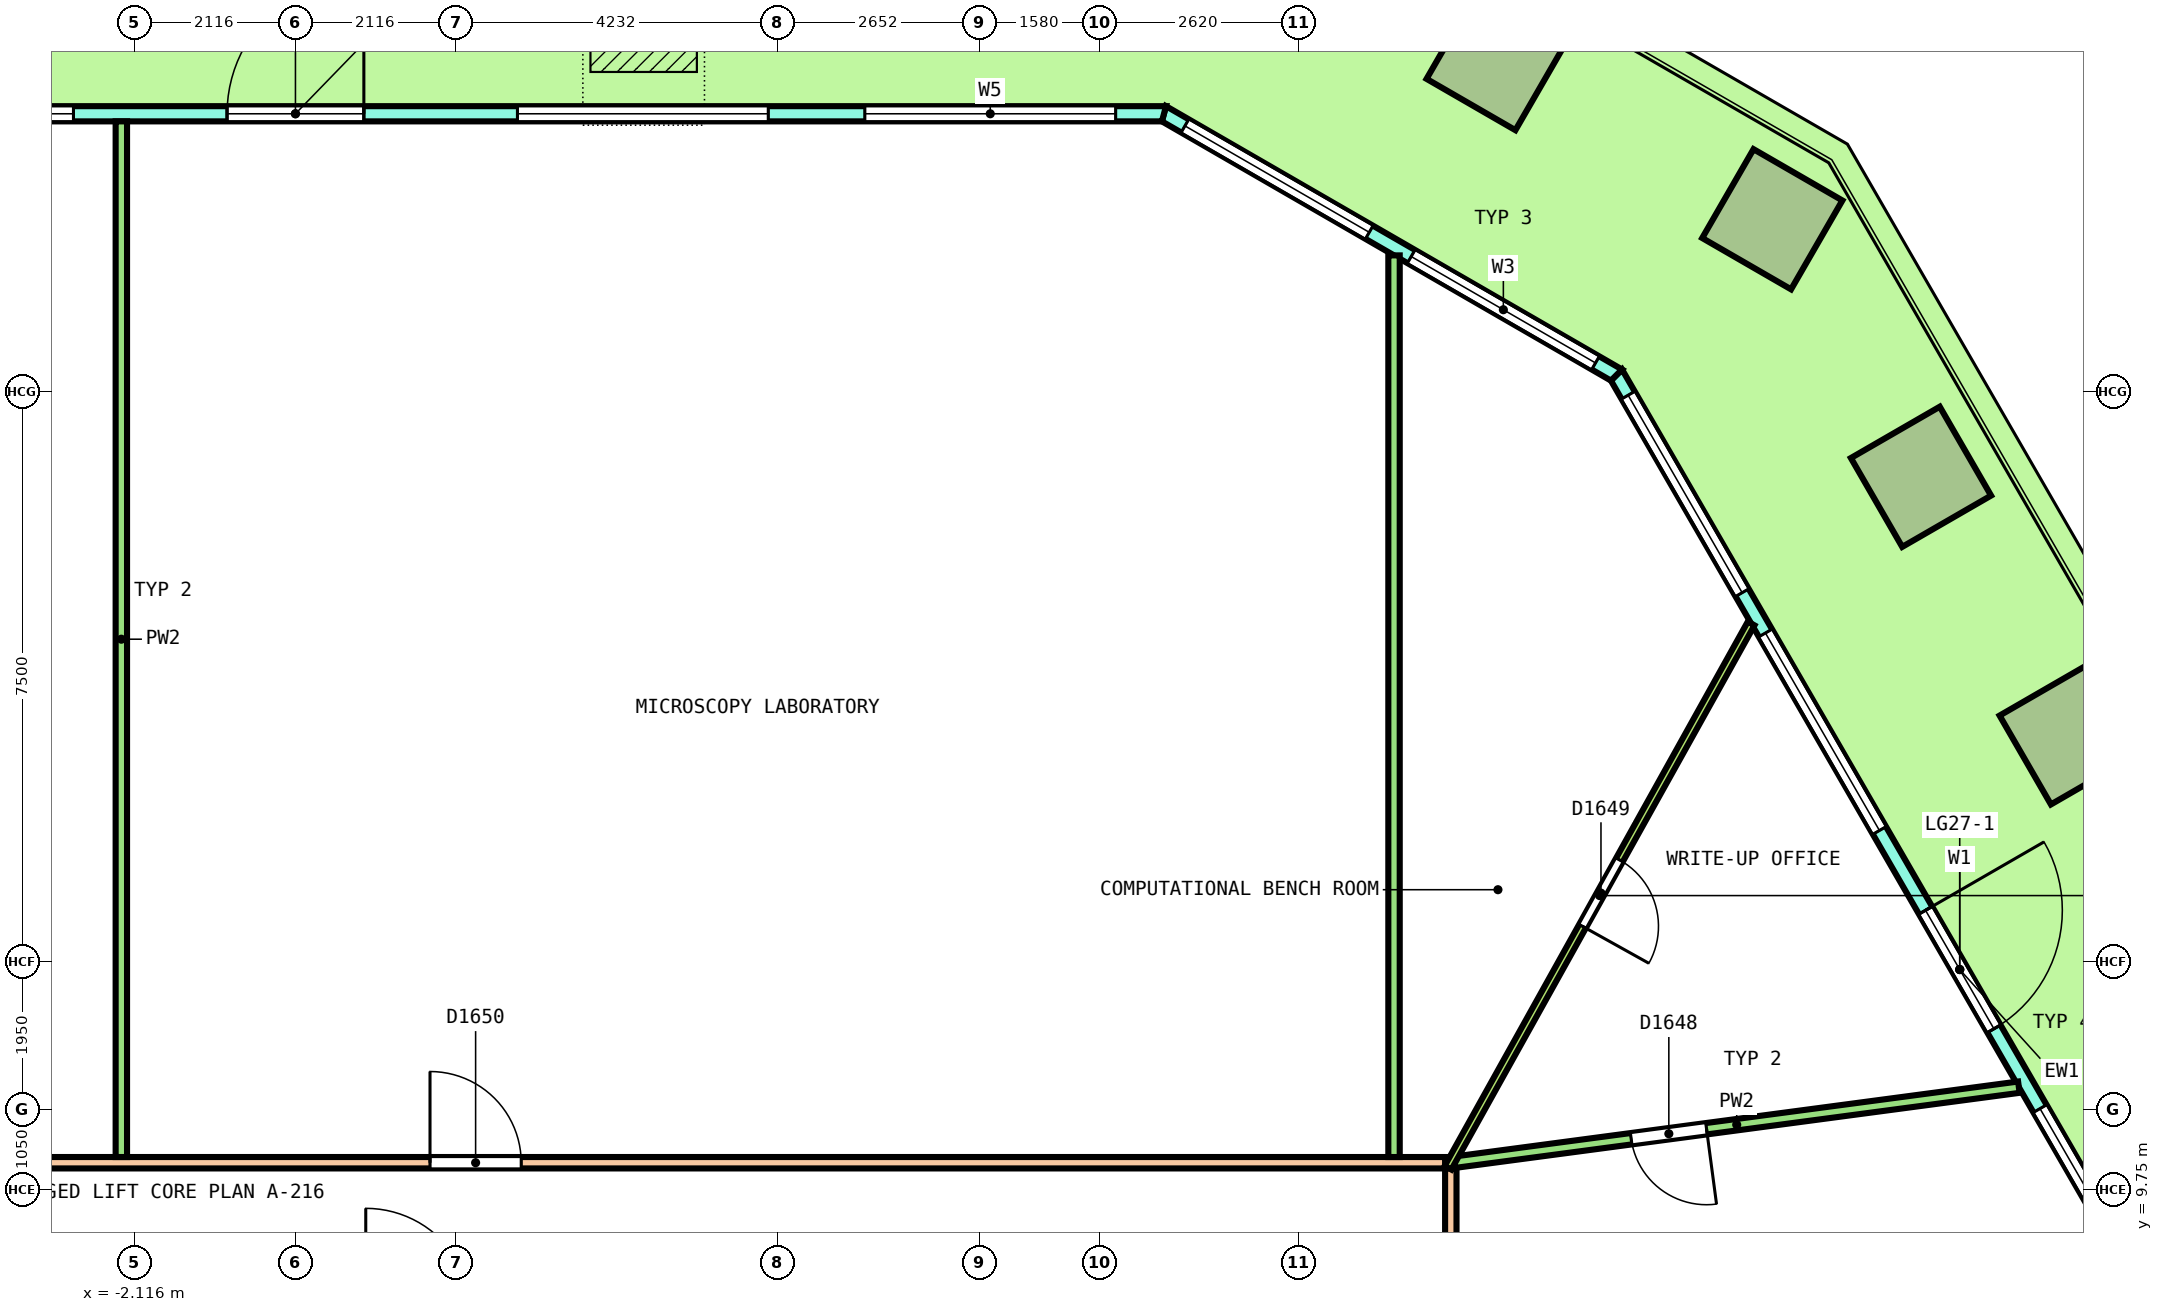
"""IFC4 building model, lengths in metres.
Left out: names, types, materials, properties, quantities, classifications, styles, units other than length and angle.
Written with IfcOpenShell. Run it as: python <this file> out.ifc"""

import sys

from ifc_helpers import new_model, si_unit, direction, frame, frame_2d, origin, origin_2d, place, context, subcontext, project, spatial, polyline, rectangle, outline, extrude, element, fill, save


model = new_model("IFC4")
c1 = context("Model", 3, precision=1e-05, world=origin(), true_north=direction((0.0, 1.0)))
c2 = subcontext(c1, "Body", "Model", "MODEL_VIEW")
j1 = project(units=[si_unit("LENGTHUNIT", "METRE"), si_unit("PLANEANGLEUNIT", "RADIAN")], contexts=[c1])
p1 = place(None, origin())
s1 = spatial("IfcSite", under=j1, at=p1, CompositionType="ELEMENT")
p2 = place(p1, origin())
s2 = spatial("IfcBuilding", under=s1, at=p2, CompositionType="ELEMENT")
p3 = place(p2, frame((0.0, 0.0, 126.4)))
s3 = spatial("IfcBuildingStorey", under=s2, at=p3, CompositionType="ELEMENT", Elevation=126.4)
for number, where, z_axis, x_axis in (
    (1, (23.342, 15.736, 0.0), (0.0, 0.0, 1.0), (-0.5, 0.866, 0.0)),
    (2, (21.386, 19.124, 0.0), (0.0, 0.0, 1.0), (-0.5, 0.866, 0.0)),
    (3, (19.43, 22.512, 0.0), (0.0, 0.0, 1.0), (-0.866, 0.5, 0.0)),
    (4, (15.803, 24.606, 0.0), (0.0, 0.0, 1.0), (-0.866, 0.5, 0.0)),
):
    element("IfcColumn", number, at=place(p3, frame(where, z_axis=z_axis, x_axis=x_axis)), inside=s3, PredefinedType="COLUMN", context=c2, shape_type="SweptSolid", body=[
        extrude(rectangle(XDim=1.35, YDim=1.35, at=origin_2d()), origin(), (0.0, 0.0, 1.0), 4.05),
    ])
p4 = place(p3, frame((26.411, 4.82, 0.0), z_axis=(0.0, 0.0, 1.0), x_axis=(-0.500000137386, 0.866025324465, 0.0)))
e5 = element("IfcWall", 5, at=p4, inside=s3, PredefinedType="SOLIDWALL", context=c2, shape_type="SweptSolid", body=[
    extrude(outline(polyline([(-0.027, -0.1), (0.979, -0.1), (1.986, -0.1), (2.992, -0.1), (3.999, -0.1), (5.005, -0.1), (6.012, -0.1), (7.018, -0.1), (8.025, -0.1), (9.031, -0.1), (10.038, -0.1), (11.044, -0.1), (12.051, -0.1), (13.057, -0.1), (14.063, -0.1), (15.07, -0.1), (16.076, -0.1), (17.083, -0.1), (18.089, -0.1), (18.036, 0.1), (17.035, 0.1), (16.035, 0.1), (15.034, 0.1), (14.034, 0.1), (13.033, 0.1), (12.033, 0.1), (11.032, 0.1), (10.032, 0.1), (9.031, 0.1), (8.031, 0.1), (7.03, 0.1), (6.03, 0.1), (5.029, 0.1), (4.029, 0.1), (3.028, 0.1), (2.028, 0.1), (1.027, 0.1), (0.027, 0.1), (-0.027, -0.1)])), origin(), (0.0, 0.0, 1.0), 4.1),
])
p5 = place(p4, frame((0.306, 0.0, 0.1)))
e6 = element("IfcOpeningElement", 6, at=p5, cuts=e5, PredefinedType="OPENING", context=c2, shape_type="SweptSolid", body=[
    extrude(rectangle(XDim=3.0, YDim=2.9, at=frame_2d((1.5, 1.45))), frame((0.0, 0.11, 0.0), z_axis=(0.0, -1.0, 0.0), x_axis=(1.0, 0.0, 0.0)), (0.0, 0.0, 1.0), 0.22),
])
p6 = place(p4, frame((3.919, 0.0, 0.1)))
e7 = element("IfcOpeningElement", 7, at=p6, cuts=e5, PredefinedType="OPENING", context=c2, shape_type="SweptSolid", body=[
    extrude(rectangle(XDim=3.0, YDim=2.9, at=frame_2d((1.5, 1.45))), frame((0.0, 0.11, 0.0), z_axis=(0.0, -1.0, 0.0), x_axis=(1.0, 0.0, 0.0)), (0.0, 0.0, 1.0), 0.22),
])
p7 = place(p4, frame((8.131, 0.0, 0.0)))
e8 = element("IfcOpeningElement", 8, at=p7, cuts=e5, PredefinedType="OPENING", context=c2, shape_type="SweptSolid", body=[
    extrude(rectangle(XDim=1.8, YDim=2.4, at=frame_2d((0.9, 1.2))), frame((0.0, 0.11, 0.0), z_axis=(0.0, -1.0, 0.0), x_axis=(1.0, 0.0, 0.0)), (0.0, 0.0, 1.0), 0.22),
])
p8 = place(p4, frame((8.131, 0.0, 2.55)))
e9 = element("IfcOpeningElement", 9, at=p8, cuts=e5, PredefinedType="OPENING", context=c2, shape_type="SweptSolid", body=[
    extrude(rectangle(XDim=1.8, YDim=0.45, at=frame_2d((0.9, 0.225))), frame((0.0, 0.11, 0.0), z_axis=(0.0, -1.0, 0.0), x_axis=(1.0, 0.0, 0.0)), (0.0, 0.0, 1.0), 0.22),
])
p9 = place(p4, frame((11.144, 0.0, 0.1)))
e10 = element("IfcOpeningElement", 10, at=p9, cuts=e5, PredefinedType="OPENING", context=c2, shape_type="SweptSolid", body=[
    extrude(rectangle(XDim=3.0, YDim=2.9, at=frame_2d((1.5, 1.45))), frame((0.0, 0.11, 0.0), z_axis=(0.0, -1.0, 0.0), x_axis=(1.0, 0.0, 0.0)), (0.0, 0.0, 1.0), 0.22),
])
p10 = place(p4, frame((14.756, 0.0, 0.1)))
e11 = element("IfcOpeningElement", 11, at=p10, cuts=e5, PredefinedType="OPENING", context=c2, shape_type="SweptSolid", body=[
    extrude(rectangle(XDim=3.0, YDim=2.9, at=frame_2d((1.5, 1.45))), frame((0.0, 0.11, 0.0), z_axis=(0.0, -1.0, 0.0), x_axis=(1.0, 0.0, 0.0)), (0.0, 0.0, 1.0), 0.22),
])
p11 = place(p3, frame((17.38, 20.463, 0.0), z_axis=(0.0, 0.0, 1.0), x_axis=(-0.866029458321, 0.49999297727, 0.0)))
e12 = element("IfcWall", 12, at=p11, inside=s3, PredefinedType="SOLIDWALL", context=c2, shape_type="SweptSolid", body=[
    extrude(outline(polyline([(-0.027, -0.1), (1.128, -0.1), (2.282, -0.1), (3.437, -0.1), (4.592, -0.1), (5.747, -0.1), (6.901, -0.1), (6.848, 0.1), (5.711, 0.1), (4.574, 0.1), (3.437, 0.1), (2.301, 0.1), (1.164, 0.1), (0.027, 0.1), (-0.027, -0.1)])), origin(), (0.0, 0.0, 1.0), 4.1),
])
p12 = place(p11, frame((0.319, 0.0, 0.1)))
e13 = element("IfcOpeningElement", 13, at=p12, cuts=e12, PredefinedType="OPENING", context=c2, shape_type="SweptSolid", body=[
    extrude(rectangle(XDim=2.8, YDim=2.9, at=frame_2d((1.4, 1.45))), frame((0.0, 0.11, 0.0), z_axis=(0.0, -1.0, 0.0), x_axis=(1.0, 0.0, 0.0)), (0.0, 0.0, 1.0), 0.22),
])
p13 = place(p11, frame((3.756, 0.0, 0.1)))
e14 = element("IfcOpeningElement", 14, at=p13, cuts=e12, PredefinedType="OPENING", context=c2, shape_type="SweptSolid", body=[
    extrude(rectangle(XDim=2.8, YDim=2.9, at=frame_2d((1.4, 1.45))), frame((0.0, 0.11, 0.0), z_axis=(0.0, -1.0, 0.0), x_axis=(1.0, 0.0, 0.0)), (0.0, 0.0, 1.0), 0.22),
])
p14 = place(p3, frame((11.426, 23.9, 0.0), z_axis=(0.0, 0.0, 1.0), x_axis=(-1.0, 0.0, 0.0)))
e15 = element("IfcWall", 15, at=p14, inside=s3, PredefinedType="SOLIDWALL", context=c2, shape_type="SweptSolid", body=[
    extrude(outline(polyline([(-0.027, -0.1), (1.014, -0.1), (2.055, -0.1), (3.097, -0.1), (4.138, -0.1), (5.179, -0.1), (6.22, -0.1), (7.261, -0.1), (8.303, -0.1), (9.344, -0.1), (10.385, -0.1), (11.426, -0.1), (12.468, -0.1), (13.509, -0.1), (14.55, -0.1), (15.591, -0.1), (16.632, -0.1), (17.673, -0.1), (18.715, -0.1), (19.756, -0.1), (20.797, -0.1), (21.838, -0.1), (22.879, -0.1), (22.826, 0.1), (21.789, 0.1), (20.753, 0.1), (19.717, 0.1), (18.68, 0.1), (17.644, 0.1), (16.608, 0.1), (15.572, 0.1), (14.535, 0.1), (13.499, 0.1), (12.463, 0.1), (11.426, 0.1), (10.39, 0.1), (9.354, 0.1), (8.317, 0.1), (7.281, 0.1), (6.245, 0.1), (5.208, 0.1), (4.172, 0.1), (3.136, 0.1), (2.099, 0.1), (1.063, 0.1), (0.027, 0.1), (-0.027, -0.1)])), origin(), (0.0, 0.0, 1.0), 4.1),
])
p15 = place(p14, frame((0.635, 0.0, 0.1)))
e16 = element("IfcOpeningElement", 16, at=p15, cuts=e15, PredefinedType="OPENING", context=c2, shape_type="SweptSolid", body=[
    extrude(rectangle(XDim=3.3, YDim=2.9, at=frame_2d((1.65, 1.45))), frame((0.0, 0.11, 0.0), z_axis=(0.0, -1.0, 0.0), x_axis=(1.0, 0.0, 0.0)), (0.0, 0.0, 1.0), 0.22),
])
p16 = place(p14, frame((5.206, 0.0, 0.1)))
e17 = element("IfcOpeningElement", 17, at=p16, cuts=e15, PredefinedType="OPENING", context=c2, shape_type="SweptSolid", body=[
    extrude(rectangle(XDim=3.3, YDim=2.9, at=frame_2d((1.65, 1.45))), frame((0.0, 0.11, 0.0), z_axis=(0.0, -1.0, 0.0), x_axis=(1.0, 0.0, 0.0)), (0.0, 0.0, 1.0), 0.22),
])
p17 = place(p14, frame((10.526, 0.0, 0.0)))
e18 = element("IfcOpeningElement", 18, at=p17, cuts=e15, PredefinedType="OPENING", context=c2, shape_type="SweptSolid", body=[
    extrude(rectangle(XDim=1.8, YDim=2.4, at=frame_2d((0.9, 1.2))), frame((0.0, 0.11, 0.0), z_axis=(0.0, -1.0, 0.0), x_axis=(1.0, 0.0, 0.0)), (0.0, 0.0, 1.0), 0.22),
])
p18 = place(p14, frame((10.526, 0.0, 2.55)))
e19 = element("IfcOpeningElement", 19, at=p18, cuts=e15, PredefinedType="OPENING", context=c2, shape_type="SweptSolid", body=[
    extrude(rectangle(XDim=1.8, YDim=0.45, at=frame_2d((0.9, 0.225))), frame((0.0, 0.11, 0.0), z_axis=(0.0, -1.0, 0.0), x_axis=(1.0, 0.0, 0.0)), (0.0, 0.0, 1.0), 0.22),
])
p19 = place(p14, frame((14.347, 0.0, 0.1)))
e20 = element("IfcOpeningElement", 20, at=p19, cuts=e15, PredefinedType="OPENING", context=c2, shape_type="SweptSolid", body=[
    extrude(rectangle(XDim=3.3, YDim=2.9, at=frame_2d((1.65, 1.45))), frame((0.0, 0.11, 0.0), z_axis=(0.0, -1.0, 0.0), x_axis=(1.0, 0.0, 0.0)), (0.0, 0.0, 1.0), 0.22),
])
p20 = place(p14, frame((18.917, 0.0, 0.1)))
e21 = element("IfcOpeningElement", 21, at=p20, cuts=e15, PredefinedType="OPENING", context=c2, shape_type="SweptSolid", body=[
    extrude(rectangle(XDim=3.3, YDim=2.9, at=frame_2d((1.65, 1.45))), frame((0.0, 0.11, 0.0), z_axis=(0.0, -1.0, 0.0), x_axis=(1.0, 0.0, 0.0)), (0.0, 0.0, 1.0), 0.22),
])
p21 = place(p3, frame((15.2, 0.576, 0.0), z_axis=(0.0, 0.0, 1.0), x_axis=(0.0, 1.0, 0.0)))
e22 = element("IfcWall", 22, at=p21, inside=s3, PredefinedType="PARTITIONING", context=c2, shape_type="SweptSolid", body=[
    extrude(rectangle(XDim=9.449, YDim=0.15, at=frame_2d((4.725, 0.0))), origin(), (0.0, 0.0, 1.0), 3.05),
])
p22 = place(p3, frame((-15.125, 10.1, 0.0), z_axis=(0.0, 0.0, 1.0), x_axis=(1.0, 0.0, 0.0)))
e23 = element("IfcWall", 23, at=p22, inside=s3, PredefinedType="PARTITIONING", context=c2, shape_type="SweptSolid", body=[
    extrude(rectangle(XDim=30.25, YDim=0.15, at=frame_2d((15.125, 0.0))), origin(), (0.0, 0.0, 1.0), 3.05),
])
p23 = place(p22, frame((16.895, 0.0, 0.0)))
e24 = element("IfcOpeningElement", 24, at=p23, cuts=e23, PredefinedType="OPENING", context=c2, shape_type="SweptSolid", body=[
    extrude(rectangle(XDim=1.2, YDim=2.1, at=frame_2d((0.6, 1.05))), frame((0.0, 0.085, 0.0), z_axis=(0.0, -1.0, 0.0), x_axis=(1.0, 0.0, 0.0)), (0.0, 0.0, 1.0), 0.17),
])
p24 = place(p22, frame((6.564, 0.0, 0.0)))
e25 = element("IfcOpeningElement", 25, at=p24, cuts=e23, PredefinedType="OPENING", context=c2, shape_type="SweptSolid", body=[
    extrude(rectangle(XDim=1.2, YDim=2.1, at=frame_2d((0.6, 1.05))), frame((0.0, 0.085, 0.0), z_axis=(0.0, -1.0, 0.0), x_axis=(1.0, 0.0, 0.0)), (0.0, 0.0, 1.0), 0.17),
])
p25 = place(p22, frame((1.476, 0.0, 0.0)))
e26 = element("IfcOpeningElement", 26, at=p25, cuts=e23, PredefinedType="OPENING", context=c2, shape_type="SweptSolid", body=[
    extrude(rectangle(XDim=1.2, YDim=2.1, at=frame_2d((0.6, 1.05))), frame((0.0, 0.085, 0.0), z_axis=(0.0, -1.0, 0.0), x_axis=(1.0, 0.0, 0.0)), (0.0, 0.0, 1.0), 0.17),
])
p26 = place(p3, frame((15.25, 10.107, 0.0), z_axis=(0.0, 0.0, 1.0), x_axis=(0.991272259153, 0.131830604315, 0.0)))
e27 = element("IfcWall", 27, at=p26, inside=s3, PredefinedType="PARTITIONING", context=c2, shape_type="SweptSolid", body=[
    extrude(rectangle(XDim=7.489, YDim=0.15, at=frame_2d((3.745, 0.0))), origin(), (0.0, 0.0, 1.0), 3.05),
])
p27 = place(p26, frame((2.344, 0.0, 0.0)))
e28 = element("IfcOpeningElement", 28, at=p27, cuts=e27, PredefinedType="OPENING", context=c2, shape_type="SweptSolid", body=[
    extrude(rectangle(XDim=1.0, YDim=2.1, at=frame_2d((0.5, 1.05))), frame((0.0, 0.085, 0.0), z_axis=(0.0, -1.0, 0.0), x_axis=(1.0, 0.0, 0.0)), (0.0, 0.0, 1.0), 0.17),
])
p28 = place(p3, frame((14.453, 10.175, 0.0), z_axis=(0.0, 0.0, 1.0), x_axis=(0.0, 1.0, 0.0)))
e29 = element("IfcWall", 29, at=p28, inside=s3, PredefinedType="PARTITIONING", context=c2, shape_type="SweptSolid", body=[
    extrude(rectangle(XDim=11.862, YDim=0.15, at=frame_2d((5.931, 0.0))), origin(), (0.0, 0.0, 1.0), 3.05),
])
p29 = place(p3, frame((-2.291, 10.175, 0.0), z_axis=(0.0, 0.0, 1.0), x_axis=(0.0, 1.0, 0.0)))
e30 = element("IfcWall", 30, at=p29, inside=s3, PredefinedType="PARTITIONING", context=c2, shape_type="SweptSolid", body=[
    extrude(rectangle(XDim=13.625, YDim=0.15, at=frame_2d((6.812, 0.0))), origin(), (0.0, 0.0, 1.0), 3.05),
])
p30 = place(p3, frame((15.164, 10.034, 0.0), z_axis=(0.0, 0.0, 1.0), x_axis=(0.486568356271, 0.873642509655, 0.0)))
e31 = element("IfcWall", 31, at=p30, inside=s3, PredefinedType="PARTITIONING", context=c2, shape_type="SweptSolid", body=[
    extrude(rectangle(XDim=8.196, YDim=0.1, at=frame_2d((4.098, 0.0))), origin(), (0.0, 0.0, 1.0), 3.05),
])
p31 = place(p30, frame((3.635, 0.0, 0.0)))
e32 = element("IfcOpeningElement", 32, at=p31, cuts=e31, PredefinedType="OPENING", context=c2, shape_type="SweptSolid", body=[
    extrude(rectangle(XDim=1.0, YDim=2.1, at=frame_2d((0.5, 1.05))), frame((0.0, 0.06, 0.0), z_axis=(0.0, -1.0, 0.0), x_axis=(1.0, 0.0, 0.0)), (0.0, 0.0, 1.0), 0.12),
])
p32 = place(p6, origin())
e33 = element("IfcWindow", 33, at=p32, inside=s3, PartitioningType="SINGLE_PANEL", PredefinedType="WINDOW", context=c2, shape_type="SweptSolid", body=[
    extrude(rectangle(XDim=3.0, YDim=2.9, at=frame_2d((1.5, 1.45))), frame((0.0, 0.03, 0.0), z_axis=(0.0, -1.0, 0.0), x_axis=(1.0, 0.0, 0.0)), (0.0, 0.0, 1.0), 0.06),
])
fill(e7, e33)
p33 = place(p7, origin())
e34 = element("IfcDoor", 34, at=p33, inside=s3, OperationType="DOUBLE_DOOR_SINGLE_SWING", PredefinedType="DOOR", context=c2, shape_type="SweptSolid", body=[
    extrude(rectangle(XDim=1.8, YDim=2.4, at=frame_2d((0.9, 1.2))), frame((0.0, 0.025, 0.0), z_axis=(0.0, -1.0, 0.0), x_axis=(1.0, 0.0, 0.0)), (0.0, 0.0, 1.0), 0.05),
])
fill(e8, e34)
p34 = place(p8, origin())
e35 = element("IfcWindow", 35, at=p34, inside=s3, PartitioningType="SINGLE_PANEL", PredefinedType="WINDOW", context=c2, shape_type="SweptSolid", body=[
    extrude(rectangle(XDim=1.8, YDim=0.45, at=frame_2d((0.9, 0.225))), frame((0.0, 0.03, 0.0), z_axis=(0.0, -1.0, 0.0), x_axis=(1.0, 0.0, 0.0)), (0.0, 0.0, 1.0), 0.06),
])
fill(e9, e35)
p35 = place(p9, origin())
e36 = element("IfcWindow", 36, at=p35, inside=s3, PartitioningType="SINGLE_PANEL", PredefinedType="WINDOW", context=c2, shape_type="SweptSolid", body=[
    extrude(rectangle(XDim=3.0, YDim=2.9, at=frame_2d((1.5, 1.45))), frame((0.0, 0.03, 0.0), z_axis=(0.0, -1.0, 0.0), x_axis=(1.0, 0.0, 0.0)), (0.0, 0.0, 1.0), 0.06),
])
fill(e10, e36)
p36 = place(p10, origin())
e37 = element("IfcWindow", 37, at=p36, inside=s3, PartitioningType="SINGLE_PANEL", PredefinedType="WINDOW", context=c2, shape_type="SweptSolid", body=[
    extrude(rectangle(XDim=3.0, YDim=2.9, at=frame_2d((1.5, 1.45))), frame((0.0, 0.03, 0.0), z_axis=(0.0, -1.0, 0.0), x_axis=(1.0, 0.0, 0.0)), (0.0, 0.0, 1.0), 0.06),
])
fill(e11, e37)
p37 = place(p12, origin())
e38 = element("IfcWindow", 38, at=p37, inside=s3, PartitioningType="SINGLE_PANEL", PredefinedType="WINDOW", context=c2, shape_type="SweptSolid", body=[
    extrude(rectangle(XDim=2.8, YDim=2.9, at=frame_2d((1.4, 1.45))), frame((0.0, 0.03, 0.0), z_axis=(0.0, -1.0, 0.0), x_axis=(1.0, 0.0, 0.0)), (0.0, 0.0, 1.0), 0.06),
])
fill(e13, e38)
p38 = place(p13, origin())
e39 = element("IfcWindow", 39, at=p38, inside=s3, PartitioningType="SINGLE_PANEL", PredefinedType="WINDOW", context=c2, shape_type="SweptSolid", body=[
    extrude(rectangle(XDim=2.8, YDim=2.9, at=frame_2d((1.4, 1.45))), frame((0.0, 0.03, 0.0), z_axis=(0.0, -1.0, 0.0), x_axis=(1.0, 0.0, 0.0)), (0.0, 0.0, 1.0), 0.06),
])
fill(e14, e39)
p39 = place(p15, origin())
e40 = element("IfcWindow", 40, at=p39, inside=s3, PartitioningType="SINGLE_PANEL", PredefinedType="WINDOW", context=c2, shape_type="SweptSolid", body=[
    extrude(rectangle(XDim=3.3, YDim=2.9, at=frame_2d((1.65, 1.45))), frame((0.0, 0.03, 0.0), z_axis=(0.0, -1.0, 0.0), x_axis=(1.0, 0.0, 0.0)), (0.0, 0.0, 1.0), 0.06),
])
fill(e16, e40)
p40 = place(p16, origin())
e41 = element("IfcWindow", 41, at=p40, inside=s3, PartitioningType="SINGLE_PANEL", PredefinedType="WINDOW", context=c2, shape_type="SweptSolid", body=[
    extrude(rectangle(XDim=3.3, YDim=2.9, at=frame_2d((1.65, 1.45))), frame((0.0, 0.03, 0.0), z_axis=(0.0, -1.0, 0.0), x_axis=(1.0, 0.0, 0.0)), (0.0, 0.0, 1.0), 0.06),
])
fill(e17, e41)
p41 = place(p17, origin())
e42 = element("IfcDoor", 42, at=p41, inside=s3, OperationType="DOUBLE_DOOR_SINGLE_SWING", PredefinedType="DOOR", context=c2, shape_type="SweptSolid", body=[
    extrude(rectangle(XDim=1.8, YDim=2.4, at=frame_2d((0.9, 1.2))), frame((0.0, 0.025, 0.0), z_axis=(0.0, -1.0, 0.0), x_axis=(1.0, 0.0, 0.0)), (0.0, 0.0, 1.0), 0.05),
])
fill(e18, e42)
p42 = place(p18, origin())
e43 = element("IfcWindow", 43, at=p42, inside=s3, PartitioningType="SINGLE_PANEL", PredefinedType="WINDOW", context=c2, shape_type="SweptSolid", body=[
    extrude(rectangle(XDim=1.8, YDim=0.45, at=frame_2d((0.9, 0.225))), frame((0.0, 0.03, 0.0), z_axis=(0.0, -1.0, 0.0), x_axis=(1.0, 0.0, 0.0)), (0.0, 0.0, 1.0), 0.06),
])
fill(e19, e43)
p43 = place(p19, origin())
e44 = element("IfcWindow", 44, at=p43, inside=s3, PartitioningType="SINGLE_PANEL", PredefinedType="WINDOW", context=c2, shape_type="SweptSolid", body=[
    extrude(rectangle(XDim=3.3, YDim=2.9, at=frame_2d((1.65, 1.45))), frame((0.0, 0.03, 0.0), z_axis=(0.0, -1.0, 0.0), x_axis=(1.0, 0.0, 0.0)), (0.0, 0.0, 1.0), 0.06),
])
fill(e20, e44)
p44 = place(p27, origin())
e45 = element("IfcDoor", 45, at=p44, inside=s3, OperationType="SINGLE_SWING_RIGHT", PredefinedType="DOOR", context=c2, shape_type="SweptSolid", body=[
    extrude(rectangle(XDim=1.0, YDim=2.1, at=frame_2d((0.5, 1.05))), frame((0.0, 0.025, 0.0), z_axis=(0.0, -1.0, 0.0), x_axis=(1.0, 0.0, 0.0)), (0.0, 0.0, 1.0), 0.05),
])
fill(e28, e45)
p45 = place(p31, origin())
e46 = element("IfcDoor", 46, at=p45, inside=s3, OperationType="SINGLE_SWING_LEFT", PredefinedType="DOOR", context=c2, shape_type="SweptSolid", body=[
    extrude(rectangle(XDim=1.0, YDim=2.1, at=frame_2d((0.5, 1.05))), frame((0.0, 0.025, 0.0), z_axis=(0.0, -1.0, 0.0), x_axis=(1.0, 0.0, 0.0)), (0.0, 0.0, 1.0), 0.05),
])
fill(e32, e46)
p46 = place(p23, origin())
e47 = element("IfcDoor", 47, at=p46, inside=s3, OperationType="DOUBLE_DOOR_SINGLE_SWING", PredefinedType="DOOR", context=c2, shape_type="SweptSolid", body=[
    extrude(rectangle(XDim=1.2, YDim=2.1, at=frame_2d((0.6, 1.05))), frame((0.0, 0.025, 0.0), z_axis=(0.0, -1.0, 0.0), x_axis=(1.0, 0.0, 0.0)), (0.0, 0.0, 1.0), 0.05),
])
fill(e24, e47)
save(model, sys.argv[1])
